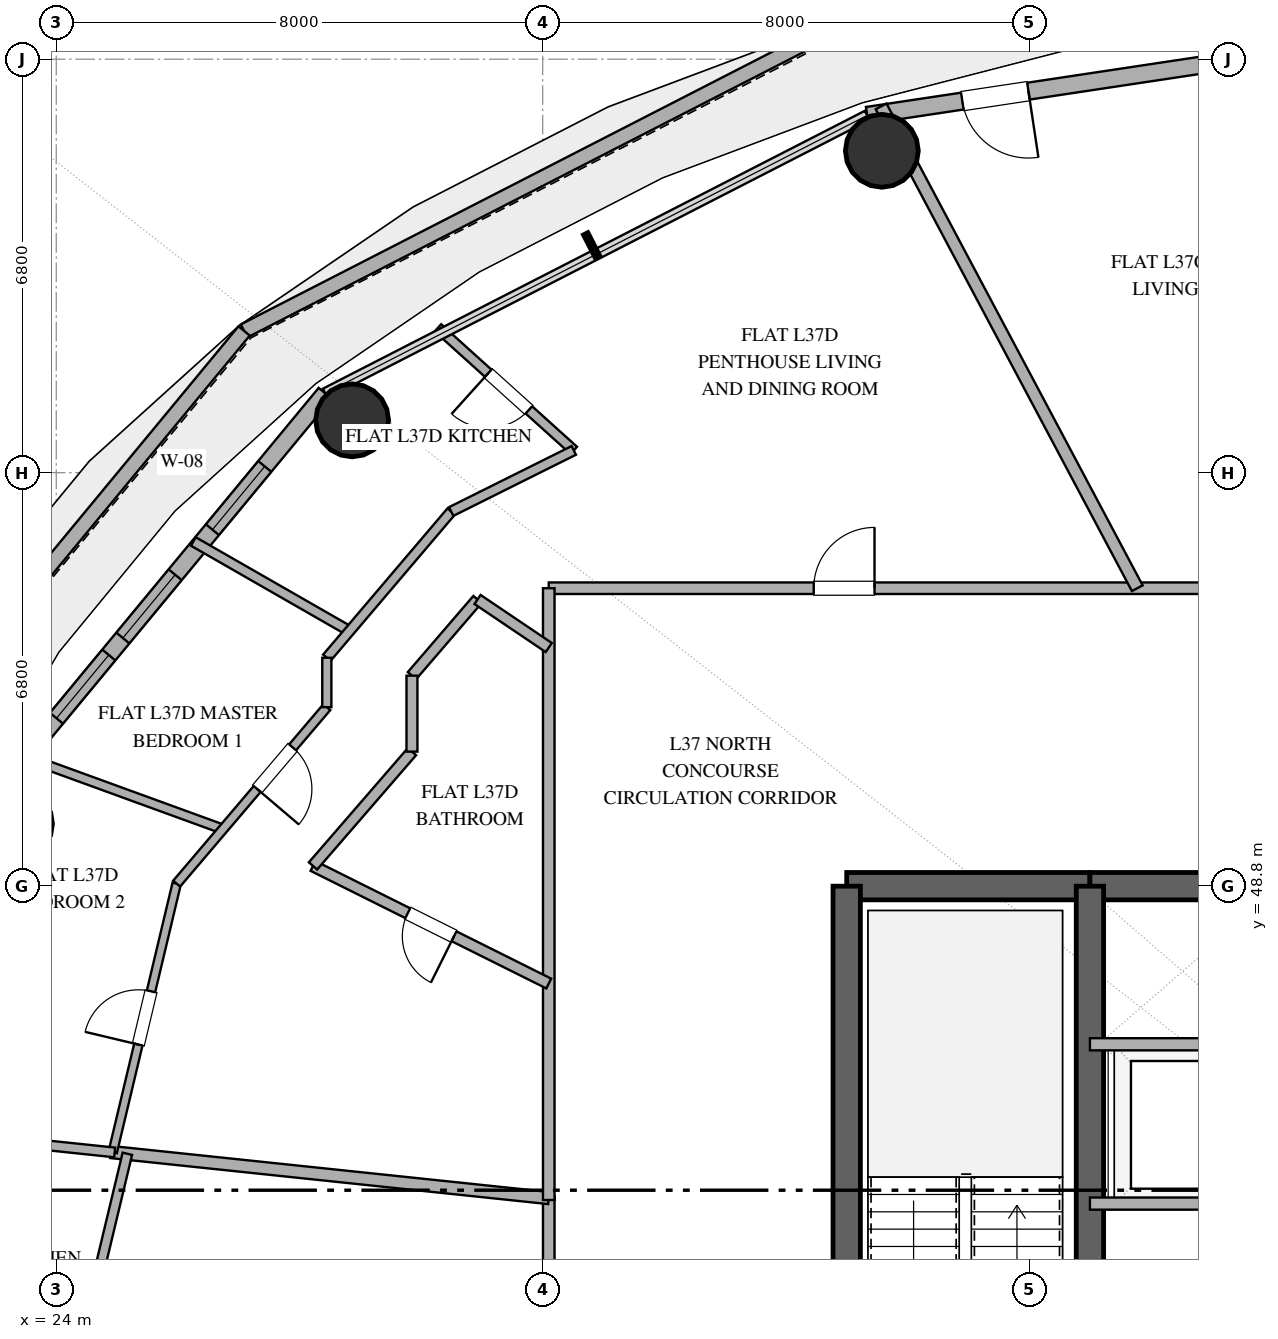
"""IFC4 building model, lengths in metres.
Left out: names, types, materials, properties, quantities, classifications, styles, units other than length and angle.
Written with IfcOpenShell. Run it as: python <this file> out.ifc"""

import sys

from ifc_helpers import new_model, si_unit, direction, frame, frame_2d, origin, origin_2d, place, context, subcontext, project, spatial, rectangle, hollow_circle, extrude, element, fill, save


model = new_model("IFC4")
c1 = context("Model", 3, precision=1e-05, world=origin(), true_north=direction((0.0, 1.0)))
c2 = subcontext(c1, "Body", "Model", "MODEL_VIEW")
j1 = project(units=[si_unit("LENGTHUNIT", "METRE"), si_unit("PLANEANGLEUNIT", "RADIAN")], contexts=[c1])
p1 = place(None, origin())
s1 = spatial("IfcSite", under=j1, at=p1, CompositionType="ELEMENT")
p2 = place(p1, origin())
s2 = spatial("IfcBuilding", under=s1, at=p2, CompositionType="ELEMENT")
p3 = place(p2, frame((0.0, 0.0, 150.6)))
s3 = spatial("IfcBuildingStorey", under=s2, at=p3, CompositionType="ELEMENT", Elevation=150.6)
p4 = place(p3, frame((37.0, 48.8, 0.0), z_axis=(0.0, 0.0, 1.0), x_axis=(1.0, 0.0, 0.0)))
e1 = element("IfcWall", 1, at=p4, inside=s3, PredefinedType="SHEAR", context=c2, shape_type="SweptSolid", body=[
    extrude(rectangle(XDim=4.0, YDim=0.45, at=frame_2d((2.0, 0.0))), origin(), (0.0, 0.0, 1.0), 3.38),
])
p5 = place(p3, frame((41.0, 48.8, 0.0), z_axis=(0.0, 0.0, 1.0), x_axis=(1.0, 0.0, 0.0)))
e2 = element("IfcWall", 2, at=p5, inside=s3, PredefinedType="SHEAR", context=c2, shape_type="SweptSolid", body=[
    extrude(rectangle(XDim=14.0, YDim=0.45, at=frame_2d((7.0, 0.0))), origin(), (0.0, 0.0, 1.0), 3.38),
])
p6 = place(p5, frame((6.1, 0.0, 0.0)))
e3 = element("IfcOpeningElement", 3, at=p6, cuts=e2, PredefinedType="OPENING", context=c2, shape_type="SweptSolid", body=[
    extrude(rectangle(XDim=1.8, YDim=2.25, at=frame_2d((0.9, 1.125))), frame((0.0, 0.235, 0.0), z_axis=(0.0, -1.0, 0.0), x_axis=(1.0, 0.0, 0.0)), (0.0, 0.0, 1.0), 0.47),
])
p7 = place(p3, frame((37.0, 35.2, 0.0), z_axis=(0.0, 0.0, 1.0), x_axis=(0.0, 1.0, 0.0)))
e4 = element("IfcWall", 4, at=p7, inside=s3, PredefinedType="SHEAR", context=c2, shape_type="SweptSolid", body=[
    extrude(rectangle(XDim=13.6, YDim=0.45, at=frame_2d((6.8, 0.0))), origin(), (0.0, 0.0, 1.0), 3.38),
])
p8 = place(p3, frame((41.0, 35.2, 0.0), z_axis=(0.0, 0.0, 1.0), x_axis=(0.0, 1.0, 0.0)))
e5 = element("IfcWall", 5, at=p8, inside=s3, PredefinedType="SHEAR", context=c2, shape_type="SweptSolid", body=[
    extrude(rectangle(XDim=13.6, YDim=0.45, at=frame_2d((6.8, 0.0))), origin(), (0.0, 0.0, 1.0), 3.38),
])
p9 = place(p8, frame((1.15, 0.0, 0.0)))
e6 = element("IfcOpeningElement", 6, at=p9, cuts=e5, PredefinedType="OPENING", context=c2, shape_type="SweptSolid", body=[
    extrude(rectangle(XDim=1.1, YDim=2.2, at=frame_2d((0.55, 1.1))), frame((0.0, 0.235, 0.0), z_axis=(0.0, -1.0, 0.0), x_axis=(1.0, 0.0, 0.0)), (0.0, 0.0, 1.0), 0.47),
])
for number, where, z_axis, x_axis in (
    (7, (37.578, 60.893, 0.0), (0.0, 0.0, 1.0), (1.0, 0.0, 0.0)),
    (8, (28.866, 56.46, 0.0), (0.0, 0.0, 1.0), (1.0, 0.0, 0.0)),
    (9, (23.338, 49.826, 0.0), (0.0, 0.0, 1.0), (1.0, 0.0, 0.0)),
):
    element("IfcColumn", number, at=place(p3, frame(where, z_axis=z_axis, x_axis=x_axis)), inside=s3, PredefinedType="COLUMN", context=c2, shape_type="SweptSolid", body=[
        extrude(hollow_circle(Radius=0.6, WallThickness=0.032, at=origin_2d()), origin(), (0.0, 0.0, 1.0), 3.38),
    ])
p10 = place(p3, frame((36.611, 62.815, 0.0), z_axis=(0.0, 0.0, 1.0), x_axis=(-0.8897661473, -0.456416698992, 0.0)))
e10 = element("IfcWall", 10, at=p10, inside=s3, PredefinedType="PARAPET", context=c2, shape_type="SweptSolid", body=[
    extrude(rectangle(XDim=10.7, YDim=0.24, at=frame_2d((5.35, 0.0))), origin(), (0.0, 0.0, 1.0), 1.25),
])
p11 = place(p3, frame((27.09, 57.931, 0.0), z_axis=(0.0, 0.0, 1.0), x_axis=(-0.637107627078, -0.770774851379, 0.0)))
e11 = element("IfcWall", 11, at=p11, inside=s3, PredefinedType="PARAPET", context=c2, shape_type="SweptSolid", body=[
    extrude(rectangle(XDim=9.483, YDim=0.24, at=frame_2d((4.742, 0.0))), origin(), (0.0, 0.0, 1.0), 1.25),
])
p12 = place(p3, frame((48.0, 63.08, 0.0), z_axis=(0.0, 0.0, 1.0), x_axis=(-0.988863993413, -0.148822049884, 0.0)))
e12 = element("IfcWall", 12, at=p12, inside=s3, PredefinedType="SOLIDWALL", context=c2, shape_type="SweptSolid", body=[
    extrude(rectangle(XDim=10.783, YDim=0.28, at=frame_2d((5.392, 0.0))), origin(), (0.0, 0.0, 1.0), 3.38),
])
p13 = place(p12, frame((8.101, 0.0, 0.0)))
e13 = element("IfcOpeningElement", 13, at=p13, cuts=e12, PredefinedType="OPENING", context=c2, shape_type="SweptSolid", body=[
    extrude(rectangle(XDim=1.1, YDim=2.25, at=frame_2d((0.55, 1.125))), frame((0.0, 0.15, 0.0), z_axis=(0.0, -1.0, 0.0), x_axis=(1.0, 0.0, 0.0)), (0.0, 0.0, 1.0), 0.3),
])
p14 = place(p3, frame((28.424, 56.906, 0.0), z_axis=(0.0, 0.0, 1.0), x_axis=(-0.637333477683, -0.770588111915, 0.0)))
e14 = element("IfcWall", 14, at=p14, inside=s3, PredefinedType="SOLIDWALL", context=c2, shape_type="SweptSolid", body=[
    extrude(rectangle(XDim=8.875, YDim=0.28, at=frame_2d((4.438, 0.0))), origin(), (0.0, 0.0, 1.0), 3.38),
])
p15 = place(p14, frame((1.561, 0.0, 0.85)))
e15 = element("IfcOpeningElement", 15, at=p15, cuts=e14, PredefinedType="OPENING", context=c2, shape_type="SweptSolid", body=[
    extrude(rectangle(XDim=1.35, YDim=1.8, at=frame_2d((0.675, 0.9))), frame((0.0, 0.15, 0.0), z_axis=(0.0, -1.0, 0.0), x_axis=(1.0, 0.0, 0.0)), (0.0, 0.0, 1.0), 0.3),
])
p16 = place(p14, frame((3.873, 0.0, 0.85)))
e16 = element("IfcOpeningElement", 16, at=p16, cuts=e14, PredefinedType="OPENING", context=c2, shape_type="SweptSolid", body=[
    extrude(rectangle(XDim=1.35, YDim=1.8, at=frame_2d((0.675, 0.9))), frame((0.0, 0.15, 0.0), z_axis=(0.0, -1.0, 0.0), x_axis=(1.0, 0.0, 0.0)), (0.0, 0.0, 1.0), 0.3),
])
p17 = place(p14, frame((5.585, 0.0, 0.85)))
e17 = element("IfcOpeningElement", 17, at=p17, cuts=e14, PredefinedType="OPENING", context=c2, shape_type="SweptSolid", body=[
    extrude(rectangle(XDim=1.35, YDim=1.8, at=frame_2d((0.675, 0.9))), frame((0.0, 0.15, 0.0), z_axis=(0.0, -1.0, 0.0), x_axis=(1.0, 0.0, 0.0)), (0.0, 0.0, 1.0), 0.3),
])
for number, where, z_axis, x_axis in (
    (18, (41.0, 46.2, 0.0), (0.0, 0.0, 1.0), (1.0, 0.0, 0.0)),
    (19, (41.0, 43.58, 0.0), (0.0, 0.0, 1.0), (1.0, 0.0, 0.0)),
):
    element("IfcWall", number, at=place(p3, frame(where, z_axis=z_axis, x_axis=x_axis)), inside=s3, PredefinedType="SOLIDWALL", context=c2, shape_type="SweptSolid", body=[
        extrude(rectangle(XDim=2.95, YDim=0.2, at=frame_2d((1.475, 0.0))), origin(), (0.0, 0.0, 1.0), 2.74),
    ])
p18 = place(p3, frame((32.1, 53.7, 0.0), z_axis=(0.0, 0.0, 1.0), x_axis=(1.0, 0.0, 0.0)))
e20 = element("IfcWall", 20, at=p18, inside=s3, PredefinedType="PARTITIONING", context=c2, shape_type="SweptSolid", body=[
    extrude(rectangle(XDim=17.576, YDim=0.19, at=frame_2d((8.788, 0.0))), origin(), (0.0, 0.0, 1.0), 2.74),
])
p19 = place(p18, frame((4.358, 0.0, 0.0)))
e21 = element("IfcOpeningElement", 21, at=p19, cuts=e20, PredefinedType="OPENING", context=c2, shape_type="SweptSolid", body=[
    extrude(rectangle(XDim=1.0, YDim=2.2, at=frame_2d((0.5, 1.1))), frame((0.0, 0.105, 0.0), z_axis=(0.0, -1.0, 0.0), x_axis=(1.0, 0.0, 0.0)), (0.0, 0.0, 1.0), 0.21),
])
p20 = place(p18, frame((11.706, 0.0, 0.0)))
e22 = element("IfcOpeningElement", 22, at=p20, cuts=e20, PredefinedType="OPENING", context=c2, shape_type="SweptSolid", body=[
    extrude(rectangle(XDim=1.0, YDim=2.2, at=frame_2d((0.5, 1.1))), frame((0.0, 0.105, 0.0), z_axis=(0.0, -1.0, 0.0), x_axis=(1.0, 0.0, 0.0)), (0.0, 0.0, 1.0), 0.21),
])
p21 = place(p3, frame((37.566, 61.624, 0.0), z_axis=(0.0, 0.0, 1.0), x_axis=(0.469466796814, -0.882950126955, 0.0)))
e23 = element("IfcWall", 23, at=p21, inside=s3, PredefinedType="PARTITIONING", context=c2, shape_type="SweptSolid", body=[
    extrude(rectangle(XDim=8.975, YDim=0.2, at=frame_2d((4.487, 0.0))), origin(), (0.0, 0.0, 1.0), 2.74),
])
p22 = place(p3, frame((32.1, 30.3, 0.0), z_axis=(0.0, 0.0, 1.0), x_axis=(0.0, 1.0, 0.0)))
e24 = element("IfcWall", 24, at=p22, inside=s3, PredefinedType="PARTITIONING", context=c2, shape_type="SweptSolid", body=[
    extrude(rectangle(XDim=13.403, YDim=0.19, at=frame_2d((6.702, 0.0))), origin(), (0.0, 0.0, 1.0), 2.74),
])
p23 = place(p22, frame((3.531, 0.0, 0.0)))
e25 = element("IfcOpeningElement", 25, at=p23, cuts=e24, PredefinedType="OPENING", context=c2, shape_type="SweptSolid", body=[
    extrude(rectangle(XDim=1.0, YDim=2.2, at=frame_2d((0.5, 1.1))), frame((0.0, 0.105, 0.0), z_axis=(0.0, -1.0, 0.0), x_axis=(1.0, 0.0, 0.0)), (0.0, 0.0, 1.0), 0.21),
])
p24 = place(p3, frame((32.1, 43.671, 0.0), z_axis=(0.0, 0.0, 1.0), x_axis=(-0.994522615629, 0.104521610217, 0.0)))
e26 = element("IfcWall", 26, at=p24, inside=s3, PredefinedType="PARTITIONING", context=c2, shape_type="SweptSolid", body=[
    extrude(rectangle(XDim=7.243, YDim=0.2, at=frame_2d((3.622, 0.0))), origin(), (0.0, 0.0, 1.0), 2.74),
])
p25 = place(p3, frame((32.1, 43.639, 0.0), z_axis=(0.0, 0.0, 1.0), x_axis=(0.0, 1.0, 0.0)))
e27 = element("IfcWall", 27, at=p25, inside=s3, PredefinedType="PARTITIONING", context=c2, shape_type="SweptSolid", body=[
    extrude(rectangle(XDim=10.061, YDim=0.19, at=frame_2d((5.031, 0.0))), origin(), (0.0, 0.0, 1.0), 2.74),
])
p26 = place(p3, frame((24.929, 44.425, 0.0), z_axis=(0.0, 0.0, 1.0), x_axis=(0.23166656053, 0.972795253243, 0.0)))
e28 = element("IfcWall", 28, at=p26, inside=s3, PredefinedType="PARTITIONING", context=c2, shape_type="SweptSolid", body=[
    extrude(rectangle(XDim=4.541, YDim=0.14, at=frame_2d((2.271, 0.0))), origin(), (0.0, 0.0, 1.0), 2.74),
])
p27 = place(p26, frame((1.821, 0.0, 0.0)))
e29 = element("IfcOpeningElement", 29, at=p27, cuts=e28, PredefinedType="OPENING", context=c2, shape_type="SweptSolid", body=[
    extrude(rectangle(XDim=0.9, YDim=2.1, at=frame_2d((0.45, 1.05))), frame((0.0, 0.08, 0.0), z_axis=(0.0, -1.0, 0.0), x_axis=(1.0, 0.0, 0.0)), (0.0, 0.0, 1.0), 0.16),
])
p28 = place(p3, frame((32.1, 47.199, 0.0), z_axis=(0.0, 0.0, 1.0), x_axis=(-0.89485499518, 0.446356962084, 0.0)))
e30 = element("IfcWall", 30, at=p28, inside=s3, PredefinedType="PLUMBINGWALL", context=c2, shape_type="SweptSolid", body=[
    extrude(rectangle(XDim=4.333, YDim=0.18, at=frame_2d((2.167, 0.0))), origin(), (0.0, 0.0, 1.0), 2.74),
])
p29 = place(p28, frame((1.741, 0.0, 0.0)))
e31 = element("IfcOpeningElement", 31, at=p29, cuts=e30, PredefinedType="OPENING", context=c2, shape_type="SweptSolid", body=[
    extrude(rectangle(XDim=0.85, YDim=2.1, at=frame_2d((0.425, 1.05))), frame((0.0, 0.1, 0.0), z_axis=(0.0, -1.0, 0.0), x_axis=(1.0, 0.0, 0.0)), (0.0, 0.0, 1.0), 0.2),
])
p30 = place(p3, frame((26.742, 49.737, 0.0), z_axis=(0.0, 0.0, 1.0), x_axis=(-0.939702146374, 0.341993970854, 0.0)))
e32 = element("IfcWall", 32, at=p30, inside=s3, PredefinedType="PARTITIONING", context=c2, shape_type="SweptSolid", body=[
    extrude(rectangle(XDim=3.594, YDim=0.15, at=frame_2d((1.797, 0.0))), origin(), (0.0, 0.0, 1.0), 2.74),
])
p31 = place(p3, frame((21.425, 44.793, 0.0), z_axis=(0.0, 0.0, 1.0), x_axis=(0.994516359121, -0.104581123727, 0.0)))
e33 = element("IfcWall", 33, at=p31, inside=s3, PredefinedType="PLUMBINGWALL", context=c2, shape_type="SweptSolid", body=[
    extrude(rectangle(XDim=3.555, YDim=0.16, at=frame_2d((1.778, 0.0))), origin(), (0.0, 0.0, 1.0), 2.74),
])
p32 = place(p3, frame((32.512, 55.967, 0.0), z_axis=(0.0, 0.0, 1.0), x_axis=(-0.74263222061, 0.669699473579, 0.0)))
e34 = element("IfcWall", 34, at=p32, inside=s3, PredefinedType="PLUMBINGWALL", context=c2, shape_type="SweptSolid", body=[
    extrude(rectangle(XDim=3.009, YDim=0.16, at=frame_2d((1.505, 0.0))), origin(), (0.0, 0.0, 1.0), 2.74),
])
p33 = place(p32, frame((0.995, 0.0, 0.0)))
e35 = element("IfcOpeningElement", 35, at=p33, cuts=e34, PredefinedType="OPENING", context=c2, shape_type="SweptSolid", body=[
    extrude(rectangle(XDim=0.9, YDim=2.1, at=frame_2d((0.45, 1.05))), frame((0.0, 0.09, 0.0), z_axis=(0.0, -1.0, 0.0), x_axis=(1.0, 0.0, 0.0)), (0.0, 0.0, 1.0), 0.18),
])
p34 = place(p3, frame((26.255, 54.469, 0.0), z_axis=(0.0, 0.0, 1.0), x_axis=(0.867481094493, -0.497470150558, 0.0)))
e36 = element("IfcWall", 36, at=p34, inside=s3, PredefinedType="PLUMBINGWALL", context=c2, shape_type="SweptSolid", body=[
    extrude(rectangle(XDim=2.961, YDim=0.16, at=frame_2d((1.48, 0.0))), origin(), (0.0, 0.0, 1.0), 2.74),
])
p35 = place(p3, frame((28.45, 51.744, 0.0), z_axis=(0.0, 0.0, 1.0), x_axis=(-0.648090958091, -0.761562938988, 0.0)))
e37 = element("IfcWall", 37, at=p35, inside=s3, PredefinedType="PARTITIONING", context=c2, shape_type="SweptSolid", body=[
    extrude(rectangle(XDim=3.81, YDim=0.15, at=frame_2d((1.905, 0.0))), origin(), (0.0, 0.0, 1.0), 2.74),
])
p36 = place(p35, frame((0.868, 0.0, 0.0)))
e38 = element("IfcOpeningElement", 38, at=p36, cuts=e37, PredefinedType="OPENING", context=c2, shape_type="SweptSolid", body=[
    extrude(rectangle(XDim=0.9, YDim=2.1, at=frame_2d((0.45, 1.05))), frame((0.0, 0.085, 0.0), z_axis=(0.0, -1.0, 0.0), x_axis=(1.0, 0.0, 0.0)), (0.0, 0.0, 1.0), 0.17),
])
p37 = place(p3, frame((28.45, 52.557, 0.0), z_axis=(0.0, 0.0, 1.0), x_axis=(0.647888606369, 0.761735094201, 0.0)))
e39 = element("IfcWall", 39, at=p37, inside=s3, PredefinedType="PLUMBINGWALL", context=c2, shape_type="SweptSolid", body=[
    extrude(rectangle(XDim=3.157, YDim=0.16, at=frame_2d((1.578, 0.0))), origin(), (0.0, 0.0, 1.0), 2.74),
])
p38 = place(p3, frame((28.223, 49.133, 0.0), z_axis=(0.0, 0.0, 1.0), x_axis=(0.654567839364, 0.756003269616, 0.0)))
e40 = element("IfcWall", 40, at=p38, inside=s3, PredefinedType="PLUMBINGWALL", context=c2, shape_type="SweptSolid", body=[
    extrude(rectangle(XDim=2.486, YDim=0.18, at=frame_2d((1.243, 0.0))), origin(), (0.0, 0.0, 1.0), 2.74),
])
p39 = place(p3, frame((25.169, 44.4, 0.0), z_axis=(0.0, 0.0, 1.0), x_axis=(-0.233096038601, -0.972453719613, 0.0)))
e41 = element("IfcWall", 41, at=p39, inside=s3, PredefinedType="PLUMBINGWALL", context=c2, shape_type="SweptSolid", body=[
    extrude(rectangle(XDim=2.468, YDim=0.16, at=frame_2d((1.234, 0.0))), origin(), (0.0, 0.0, 1.0), 2.74),
])
p40 = place(p3, frame((30.495, 54.961, 0.0), z_axis=(0.0, 0.0, 1.0), x_axis=(0.894946652065, 0.446173161405, 0.0)))
e42 = element("IfcWall", 42, at=p40, inside=s3, PredefinedType="PLUMBINGWALL", context=c2, shape_type="SweptSolid", body=[
    extrude(rectangle(XDim=2.253, YDim=0.16, at=frame_2d((1.127, 0.0))), origin(), (0.0, 0.0, 1.0), 2.74),
])
p41 = place(p3, frame((29.85, 52.262, 0.0), z_axis=(0.0, 0.0, 1.0), x_axis=(0.652334661778, 0.757931058239, 0.0)))
e43 = element("IfcWall", 43, at=p41, inside=s3, PredefinedType="PLUMBINGWALL", context=c2, shape_type="SweptSolid", body=[
    extrude(rectangle(XDim=1.653, YDim=0.18, at=frame_2d((0.827, 0.0))), origin(), (0.0, 0.0, 1.0), 2.74),
])
p42 = place(p3, frame((30.928, 53.515, 0.0), z_axis=(0.0, 0.0, 1.0), x_axis=(0.829034879431, -0.55919689617, 0.0)))
e44 = element("IfcWall", 44, at=p42, inside=s3, PredefinedType="PLUMBINGWALL", context=c2, shape_type="SweptSolid", body=[
    extrude(rectangle(XDim=1.413, YDim=0.18, at=frame_2d((0.707, 0.0))), origin(), (0.0, 0.0, 1.0), 2.74),
])
p43 = place(p3, frame((29.85, 51.013, 0.0), z_axis=(0.0, 0.0, 1.0), x_axis=(0.0, 1.0, 0.0)))
e45 = element("IfcWall", 45, at=p43, inside=s3, PredefinedType="PLUMBINGWALL", context=c2, shape_type="SweptSolid", body=[
    extrude(rectangle(XDim=1.249, YDim=0.18, at=frame_2d((0.625, 0.0))), origin(), (0.0, 0.0, 1.0), 2.74),
])
p44 = place(p3, frame((28.45, 52.557, 0.0), z_axis=(0.0, 0.0, 1.0), x_axis=(0.0, -1.0, 0.0)))
e46 = element("IfcWall", 46, at=p44, inside=s3, PredefinedType="PARTITIONING", context=c2, shape_type="SweptSolid", body=[
    extrude(rectangle(XDim=0.812, YDim=0.15, at=frame_2d((0.406, 0.0))), origin(), (0.0, 0.0, 1.0), 2.74),
])
p45 = place(p13, origin())
e47 = element("IfcDoor", 47, at=p45, inside=s3, OperationType="SINGLE_SWING_LEFT", PredefinedType="DOOR", context=c2, shape_type="SweptSolid", body=[
    extrude(rectangle(XDim=1.1, YDim=2.25, at=frame_2d((0.55, 1.125))), frame((0.0, 0.025, 0.0), z_axis=(0.0, -1.0, 0.0), x_axis=(1.0, 0.0, 0.0)), (0.0, 0.0, 1.0), 0.05),
])
fill(e13, e47)
p46 = place(p15, origin())
e48 = element("IfcWindow", 48, at=p46, inside=s3, PartitioningType="SINGLE_PANEL", PredefinedType="WINDOW", context=c2, shape_type="SweptSolid", body=[
    extrude(rectangle(XDim=1.35, YDim=1.8, at=frame_2d((0.675, 0.9))), frame((0.0, 0.03, 0.0), z_axis=(0.0, -1.0, 0.0), x_axis=(1.0, 0.0, 0.0)), (0.0, 0.0, 1.0), 0.06),
])
fill(e15, e48)
p47 = place(p16, origin())
e49 = element("IfcWindow", 49, at=p47, inside=s3, PartitioningType="SINGLE_PANEL", PredefinedType="WINDOW", context=c2, shape_type="SweptSolid", body=[
    extrude(rectangle(XDim=1.35, YDim=1.8, at=frame_2d((0.675, 0.9))), frame((0.0, 0.03, 0.0), z_axis=(0.0, -1.0, 0.0), x_axis=(1.0, 0.0, 0.0)), (0.0, 0.0, 1.0), 0.06),
])
fill(e16, e49)
p48 = place(p17, origin())
e50 = element("IfcWindow", 50, at=p48, inside=s3, PartitioningType="SINGLE_PANEL", PredefinedType="WINDOW", context=c2, shape_type="SweptSolid", body=[
    extrude(rectangle(XDim=1.35, YDim=1.8, at=frame_2d((0.675, 0.9))), frame((0.0, 0.03, 0.0), z_axis=(0.0, -1.0, 0.0), x_axis=(1.0, 0.0, 0.0)), (0.0, 0.0, 1.0), 0.06),
])
fill(e17, e50)
p49 = place(p19, origin())
e51 = element("IfcDoor", 51, at=p49, inside=s3, OperationType="SINGLE_SWING_RIGHT", PredefinedType="DOOR", context=c2, shape_type="SweptSolid", body=[
    extrude(rectangle(XDim=1.0, YDim=2.2, at=frame_2d((0.5, 1.1))), frame((0.0, 0.025, 0.0), z_axis=(0.0, -1.0, 0.0), x_axis=(1.0, 0.0, 0.0)), (0.0, 0.0, 1.0), 0.05),
])
fill(e21, e51)
p50 = place(p27, origin())
e52 = element("IfcDoor", 52, at=p50, inside=s3, OperationType="SINGLE_SWING_LEFT", PredefinedType="DOOR", context=c2, shape_type="SweptSolid", body=[
    extrude(rectangle(XDim=0.9, YDim=2.1, at=frame_2d((0.45, 1.05))), frame((0.0, 0.025, 0.0), z_axis=(0.0, -1.0, 0.0), x_axis=(1.0, 0.0, 0.0)), (0.0, 0.0, 1.0), 0.05),
])
fill(e29, e52)
p51 = place(p29, origin())
e53 = element("IfcDoor", 53, at=p51, inside=s3, OperationType="SINGLE_SWING_LEFT", PredefinedType="DOOR", context=c2, shape_type="SweptSolid", body=[
    extrude(rectangle(XDim=0.85, YDim=2.1, at=frame_2d((0.425, 1.05))), frame((0.0, 0.025, 0.0), z_axis=(0.0, -1.0, 0.0), x_axis=(1.0, 0.0, 0.0)), (0.0, 0.0, 1.0), 0.05),
])
fill(e31, e53)
p52 = place(p33, origin())
e54 = element("IfcDoor", 54, at=p52, inside=s3, OperationType="SINGLE_SWING_RIGHT", PredefinedType="DOOR", context=c2, shape_type="SweptSolid", body=[
    extrude(rectangle(XDim=0.9, YDim=2.1, at=frame_2d((0.45, 1.05))), frame((0.0, 0.025, 0.0), z_axis=(0.0, -1.0, 0.0), x_axis=(1.0, 0.0, 0.0)), (0.0, 0.0, 1.0), 0.05),
])
fill(e35, e54)
p53 = place(p36, origin())
e55 = element("IfcDoor", 55, at=p53, inside=s3, OperationType="SINGLE_SWING_RIGHT", PredefinedType="DOOR", context=c2, shape_type="SweptSolid", body=[
    extrude(rectangle(XDim=0.9, YDim=2.1, at=frame_2d((0.45, 1.05))), frame((0.0, 0.025, 0.0), z_axis=(0.0, -1.0, 0.0), x_axis=(1.0, 0.0, 0.0)), (0.0, 0.0, 1.0), 0.05),
])
fill(e38, e55)
save(model, sys.argv[1])
